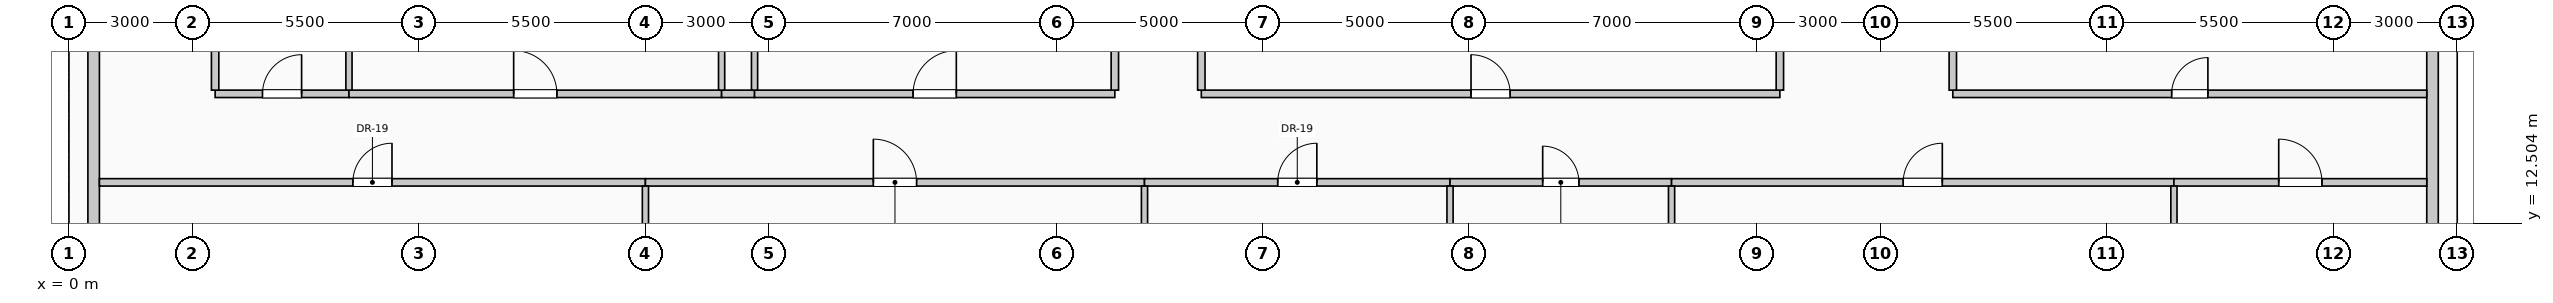
"""IFC4 building model, lengths in metres.
Left out: names, types, materials, properties, quantities, classifications, styles, units other than length and angle.
Written with IfcOpenShell. Run it as: python <this file> out.ifc"""

import sys

from ifc_helpers import new_model, si_unit, direction, frame, frame_2d, origin, place, context, subcontext, project, spatial, rectangle, extrude, element, fill, save


model = new_model("IFC4")
c1 = context("Model", 3, precision=1e-05, world=origin(), true_north=direction((0.0, 1.0)))
c2 = subcontext(c1, "Body", "Model", "MODEL_VIEW")
j1 = project(units=[si_unit("LENGTHUNIT", "METRE"), si_unit("PLANEANGLEUNIT", "RADIAN")], contexts=[c1])
p1 = place(None, origin())
s1 = spatial("IfcSite", under=j1, at=p1, CompositionType="ELEMENT")
p2 = place(p1, origin())
s2 = spatial("IfcBuilding", under=s1, at=p2, CompositionType="ELEMENT")
p3 = place(p2, frame((0.0, 0.0, 116.6)))
s3 = spatial("IfcBuildingStorey", under=s2, at=p3, CompositionType="ELEMENT", Elevation=116.6)
for number, where, z_axis, x_axis in (
    (1, (0.6, 10.445, 0.0), (0.0, 0.0, 1.0), (0.0, 1.0, 0.0)),
    (2, (57.4, 17.555, 0.0), (0.0, 0.0, 1.0), (0.0, -1.0, 0.0)),
):
    element("IfcWall", number, at=place(p3, frame(where, z_axis=z_axis, x_axis=x_axis)), inside=s3, PredefinedType="SOLIDWALL", context=c2, shape_type="SweptSolid", body=[
        extrude(rectangle(XDim=7.11, YDim=0.28, at=frame_2d((3.555, 0.0))), origin(), (0.0, 0.0, 1.0), 2.875),
    ])
p4 = place(p3, frame((0.74, 13.5, 0.0), z_axis=(0.0, 0.0, 1.0), x_axis=(1.0, 0.0, 0.0)))
e3 = element("IfcWall", 3, at=p4, inside=s3, PredefinedType="PARTITIONING", context=c2, shape_type="SweptSolid", body=[
    extrude(rectangle(XDim=13.26, YDim=0.18, at=frame_2d((6.63, 0.0))), origin(), (0.0, 0.0, 1.0), 3.725),
])
p5 = place(p4, frame((6.155, 0.0, 0.0)))
e4 = element("IfcOpeningElement", 4, at=p5, cuts=e3, PredefinedType="OPENING", context=c2, shape_type="SweptSolid", body=[
    extrude(rectangle(XDim=0.95, YDim=2.15, at=frame_2d((0.475, 1.075))), frame((0.0, 0.1, 0.0), z_axis=(0.0, -1.0, 0.0), x_axis=(1.0, 0.0, 0.0)), (0.0, 0.0, 1.0), 0.2),
])
p6 = place(p3, frame((14.0, 13.5, 0.0), z_axis=(0.0, 0.0, 1.0), x_axis=(1.0, 0.0, 0.0)))
e5 = element("IfcWall", 5, at=p6, inside=s3, PredefinedType="PARTITIONING", context=c2, shape_type="SweptSolid", body=[
    extrude(rectangle(XDim=12.12, YDim=0.18, at=frame_2d((6.06, 0.0))), origin(), (0.0, 0.0, 1.0), 3.725),
])
p7 = place(p6, frame((5.535, 0.0, 0.0)))
e6 = element("IfcOpeningElement", 6, at=p7, cuts=e5, PredefinedType="OPENING", context=c2, shape_type="SweptSolid", body=[
    extrude(rectangle(XDim=1.05, YDim=2.15, at=frame_2d((0.525, 1.075))), frame((0.0, 0.1, 0.0), z_axis=(0.0, -1.0, 0.0), x_axis=(1.0, 0.0, 0.0)), (0.0, 0.0, 1.0), 0.2),
])
p8 = place(p3, frame((26.12, 13.5, 0.0), z_axis=(0.0, 0.0, 1.0), x_axis=(1.0, 0.0, 0.0)))
e7 = element("IfcWall", 7, at=p8, inside=s3, PredefinedType="PARTITIONING", context=c2, shape_type="SweptSolid", body=[
    extrude(rectangle(XDim=7.42, YDim=0.18, at=frame_2d((3.71, 0.0))), origin(), (0.0, 0.0, 1.0), 3.725),
])
p9 = place(p8, frame((3.235, 0.0, 0.0)))
e8 = element("IfcOpeningElement", 8, at=p9, cuts=e7, PredefinedType="OPENING", context=c2, shape_type="SweptSolid", body=[
    extrude(rectangle(XDim=0.95, YDim=2.15, at=frame_2d((0.475, 1.075))), frame((0.0, 0.1, 0.0), z_axis=(0.0, -1.0, 0.0), x_axis=(1.0, 0.0, 0.0)), (0.0, 0.0, 1.0), 0.2),
])
p10 = place(p3, frame((33.54, 13.5, 0.0), z_axis=(0.0, 0.0, 1.0), x_axis=(1.0, 0.0, 0.0)))
e9 = element("IfcWall", 9, at=p10, inside=s3, PredefinedType="PARTITIONING", context=c2, shape_type="SweptSolid", body=[
    extrude(rectangle(XDim=5.38, YDim=0.18, at=frame_2d((2.69, 0.0))), origin(), (0.0, 0.0, 1.0), 3.725),
])
p11 = place(p10, frame((2.25, 0.0, 0.0)))
e10 = element("IfcOpeningElement", 10, at=p11, cuts=e9, PredefinedType="OPENING", context=c2, shape_type="SweptSolid", body=[
    extrude(rectangle(XDim=0.88, YDim=2.1, at=frame_2d((0.44, 1.05))), frame((0.0, 0.1, 0.0), z_axis=(0.0, -1.0, 0.0), x_axis=(1.0, 0.0, 0.0)), (0.0, 0.0, 1.0), 0.2),
])
p12 = place(p3, frame((38.92, 13.5, 0.0), z_axis=(0.0, 0.0, 1.0), x_axis=(1.0, 0.0, 0.0)))
e11 = element("IfcWall", 11, at=p12, inside=s3, PredefinedType="PARTITIONING", context=c2, shape_type="SweptSolid", body=[
    extrude(rectangle(XDim=12.2, YDim=0.18, at=frame_2d((6.1, 0.0))), origin(), (0.0, 0.0, 1.0), 3.725),
])
p13 = place(p12, frame((5.625, 0.0, 0.0)))
e12 = element("IfcOpeningElement", 12, at=p13, cuts=e11, PredefinedType="OPENING", context=c2, shape_type="SweptSolid", body=[
    extrude(rectangle(XDim=0.95, YDim=2.15, at=frame_2d((0.475, 1.075))), frame((0.0, 0.1, 0.0), z_axis=(0.0, -1.0, 0.0), x_axis=(1.0, 0.0, 0.0)), (0.0, 0.0, 1.0), 0.2),
])
p14 = place(p3, frame((51.12, 13.5, 0.0), z_axis=(0.0, 0.0, 1.0), x_axis=(1.0, 0.0, 0.0)))
e13 = element("IfcWall", 13, at=p14, inside=s3, PredefinedType="PARTITIONING", context=c2, shape_type="SweptSolid", body=[
    extrude(rectangle(XDim=6.14, YDim=0.18, at=frame_2d((3.07, 0.0))), origin(), (0.0, 0.0, 1.0), 3.725),
])
p15 = place(p14, frame((2.545, 0.0, 0.0)))
e14 = element("IfcOpeningElement", 14, at=p15, cuts=e13, PredefinedType="OPENING", context=c2, shape_type="SweptSolid", body=[
    extrude(rectangle(XDim=1.05, YDim=2.15, at=frame_2d((0.525, 1.075))), frame((0.0, 0.1, 0.0), z_axis=(0.0, -1.0, 0.0), x_axis=(1.0, 0.0, 0.0)), (0.0, 0.0, 1.0), 0.2),
])
p16 = place(p3, frame((3.55, 15.65, 0.0), z_axis=(0.0, 0.0, 1.0), x_axis=(1.0, 0.0, 0.0)))
e15 = element("IfcWall", 15, at=p16, inside=s3, PredefinedType="PARTITIONING", context=c2, shape_type="SweptSolid", body=[
    extrude(rectangle(XDim=3.25, YDim=0.18, at=frame_2d((1.625, 0.0))), origin(), (0.0, 0.0, 1.0), 3.725),
])
p17 = place(p16, frame((1.15, 0.0, 0.0)))
e16 = element("IfcOpeningElement", 16, at=p17, cuts=e15, PredefinedType="OPENING", context=c2, shape_type="SweptSolid", body=[
    extrude(rectangle(XDim=0.95, YDim=2.15, at=frame_2d((0.475, 1.075))), frame((0.0, 0.1, 0.0), z_axis=(0.0, -1.0, 0.0), x_axis=(1.0, 0.0, 0.0)), (0.0, 0.0, 1.0), 0.2),
])
p18 = place(p3, frame((6.8, 15.65, 0.0), z_axis=(0.0, 0.0, 1.0), x_axis=(1.0, 0.0, 0.0)))
e17 = element("IfcWall", 17, at=p18, inside=s3, PredefinedType="PARTITIONING", context=c2, shape_type="SweptSolid", body=[
    extrude(rectangle(XDim=9.05, YDim=0.18, at=frame_2d((4.525, 0.0))), origin(), (0.0, 0.0, 1.0), 3.725),
])
p19 = place(p18, frame((4.0, 0.0, 0.0)))
e18 = element("IfcOpeningElement", 18, at=p19, cuts=e17, PredefinedType="OPENING", context=c2, shape_type="SweptSolid", body=[
    extrude(rectangle(XDim=1.05, YDim=2.15, at=frame_2d((0.525, 1.075))), frame((0.0, 0.1, 0.0), z_axis=(0.0, -1.0, 0.0), x_axis=(1.0, 0.0, 0.0)), (0.0, 0.0, 1.0), 0.2),
])
p20 = place(p3, frame((15.85, 15.65, 0.0), z_axis=(0.0, 0.0, 1.0), x_axis=(1.0, 0.0, 0.0)))
e19 = element("IfcWall", 19, at=p20, inside=s3, PredefinedType="PARTITIONING", context=c2, shape_type="SweptSolid", body=[
    extrude(rectangle(XDim=0.8, YDim=0.18, at=frame_2d((0.4, 0.0))), origin(), (0.0, 0.0, 1.0), 3.725),
])
p21 = place(p3, frame((16.65, 15.65, 0.0), z_axis=(0.0, 0.0, 1.0), x_axis=(1.0, 0.0, 0.0)))
e20 = element("IfcWall", 20, at=p21, inside=s3, PredefinedType="PARTITIONING", context=c2, shape_type="SweptSolid", body=[
    extrude(rectangle(XDim=8.75, YDim=0.18, at=frame_2d((4.375, 0.0))), origin(), (0.0, 0.0, 1.0), 3.725),
])
p22 = place(p21, frame((3.85, 0.0, 0.0)))
e21 = element("IfcOpeningElement", 21, at=p22, cuts=e20, PredefinedType="OPENING", context=c2, shape_type="SweptSolid", body=[
    extrude(rectangle(XDim=1.05, YDim=2.15, at=frame_2d((0.525, 1.075))), frame((0.0, 0.1, 0.0), z_axis=(0.0, -1.0, 0.0), x_axis=(1.0, 0.0, 0.0)), (0.0, 0.0, 1.0), 0.2),
])
p23 = place(p3, frame((27.5, 15.65, 0.0), z_axis=(0.0, 0.0, 1.0), x_axis=(1.0, 0.0, 0.0)))
e22 = element("IfcWall", 22, at=p23, inside=s3, PredefinedType="PARTITIONING", context=c2, shape_type="SweptSolid", body=[
    extrude(rectangle(XDim=14.05, YDim=0.18, at=frame_2d((7.025, 0.0))), origin(), (0.0, 0.0, 1.0), 3.725),
])
p24 = place(p23, frame((6.55, 0.0, 0.0)))
e23 = element("IfcOpeningElement", 23, at=p24, cuts=e22, PredefinedType="OPENING", context=c2, shape_type="SweptSolid", body=[
    extrude(rectangle(XDim=0.95, YDim=2.15, at=frame_2d((0.475, 1.075))), frame((0.0, 0.1, 0.0), z_axis=(0.0, -1.0, 0.0), x_axis=(1.0, 0.0, 0.0)), (0.0, 0.0, 1.0), 0.2),
])
p25 = place(p3, frame((45.75, 15.65, 0.0), z_axis=(0.0, 0.0, 1.0), x_axis=(1.0, 0.0, 0.0)))
e24 = element("IfcWall", 24, at=p25, inside=s3, PredefinedType="PARTITIONING", context=c2, shape_type="SweptSolid", body=[
    extrude(rectangle(XDim=11.51, YDim=0.18, at=frame_2d((5.755, 0.0))), origin(), (0.0, 0.0, 1.0), 3.725),
])
p26 = place(p25, frame((5.315, 0.0, 0.0)))
e25 = element("IfcOpeningElement", 25, at=p26, cuts=e24, PredefinedType="OPENING", context=c2, shape_type="SweptSolid", body=[
    extrude(rectangle(XDim=0.88, YDim=2.1, at=frame_2d((0.44, 1.05))), frame((0.0, 0.1, 0.0), z_axis=(0.0, -1.0, 0.0), x_axis=(1.0, 0.0, 0.0)), (0.0, 0.0, 1.0), 0.2),
])
p27 = place(p3, frame((3.55, 15.74, 0.0), z_axis=(0.0, 0.0, 1.0), x_axis=(0.0, 1.0, 0.0)))
e26 = element("IfcWall", 26, at=p27, inside=s3, PredefinedType="PARTITIONING", context=c2, shape_type="SweptSolid", body=[
    extrude(rectangle(XDim=3.135, YDim=0.18, at=frame_2d((1.567, 0.0))), origin(), (0.0, 0.0, 1.0), 3.725),
])
p28 = place(p3, frame((6.8, 15.74, 0.0), z_axis=(0.0, 0.0, 1.0), x_axis=(0.0, 1.0, 0.0)))
e27 = element("IfcWall", 27, at=p28, inside=s3, PredefinedType="PARTITIONING", context=c2, shape_type="SweptSolid", body=[
    extrude(rectangle(XDim=3.135, YDim=0.15, at=frame_2d((1.567, 0.0))), origin(), (0.0, 0.0, 1.0), 3.725),
])
p29 = place(p3, frame((14.0, 1.175, 0.0), z_axis=(0.0, 0.0, 1.0), x_axis=(0.0, 1.0, 0.0)))
e28 = element("IfcWall", 28, at=p29, inside=s3, PredefinedType="PARTITIONING", context=c2, shape_type="SweptSolid", body=[
    extrude(rectangle(XDim=12.235, YDim=0.15, at=frame_2d((6.117, 0.0))), origin(), (0.0, 0.0, 1.0), 3.725),
])
p30 = place(p3, frame((15.85, 15.74, 0.0), z_axis=(0.0, 0.0, 1.0), x_axis=(0.0, 1.0, 0.0)))
e29 = element("IfcWall", 29, at=p30, inside=s3, PredefinedType="PARTITIONING", context=c2, shape_type="SweptSolid", body=[
    extrude(rectangle(XDim=1.76, YDim=0.15, at=frame_2d((0.88, 0.0))), origin(), (0.0, 0.0, 1.0), 3.725),
])
p31 = place(p3, frame((16.65, 15.74, 0.0), z_axis=(0.0, 0.0, 1.0), x_axis=(0.0, 1.0, 0.0)))
e30 = element("IfcWall", 30, at=p31, inside=s3, PredefinedType="PARTITIONING", context=c2, shape_type="SweptSolid", body=[
    extrude(rectangle(XDim=1.76, YDim=0.15, at=frame_2d((0.88, 0.0))), origin(), (0.0, 0.0, 1.0), 3.07),
])
p32 = place(p3, frame((25.4, 15.74, 0.0), z_axis=(0.0, 0.0, 1.0), x_axis=(0.0, 1.0, 0.0)))
e31 = element("IfcWall", 31, at=p32, inside=s3, PredefinedType="PARTITIONING", context=c2, shape_type="SweptSolid", body=[
    extrude(rectangle(XDim=7.585, YDim=0.18, at=frame_2d((3.792, 0.0))), origin(), (0.0, 0.0, 1.0), 3.725),
])
p33 = place(p3, frame((26.12, 0.74, 0.0), z_axis=(0.0, 0.0, 1.0), x_axis=(0.0, 1.0, 0.0)))
e32 = element("IfcWall", 32, at=p33, inside=s3, PredefinedType="PARTITIONING", context=c2, shape_type="SweptSolid", body=[
    extrude(rectangle(XDim=12.67, YDim=0.15, at=frame_2d((6.335, 0.0))), origin(), (0.0, 0.0, 1.0), 3.725),
])
p34 = place(p3, frame((27.5, 15.74, 0.0), z_axis=(0.0, 0.0, 1.0), x_axis=(0.0, 1.0, 0.0)))
e33 = element("IfcWall", 33, at=p34, inside=s3, PredefinedType="PARTITIONING", context=c2, shape_type="SweptSolid", body=[
    extrude(rectangle(XDim=9.57, YDim=0.18, at=frame_2d((4.785, 0.0))), origin(), (0.0, 0.0, 1.0), 3.725),
])
p35 = place(p3, frame((33.54, 1.3, 0.0), z_axis=(0.0, 0.0, 1.0), x_axis=(0.0, 1.0, 0.0)))
e34 = element("IfcWall", 34, at=p35, inside=s3, PredefinedType="PARTITIONING", context=c2, shape_type="SweptSolid", body=[
    extrude(rectangle(XDim=12.11, YDim=0.15, at=frame_2d((6.055, 0.0))), origin(), (0.0, 0.0, 1.0), 3.725),
])
p36 = place(p3, frame((38.92, 0.74, 0.0), z_axis=(0.0, 0.0, 1.0), x_axis=(0.0, 1.0, 0.0)))
e35 = element("IfcWall", 35, at=p36, inside=s3, PredefinedType="PARTITIONING", context=c2, shape_type="SweptSolid", body=[
    extrude(rectangle(XDim=12.67, YDim=0.15, at=frame_2d((6.335, 0.0))), origin(), (0.0, 0.0, 1.0), 3.725),
])
p37 = place(p3, frame((41.55, 15.74, 0.0), z_axis=(0.0, 0.0, 1.0), x_axis=(0.0, 1.0, 0.0)))
e36 = element("IfcWall", 36, at=p37, inside=s3, PredefinedType="PARTITIONING", context=c2, shape_type="SweptSolid", body=[
    extrude(rectangle(XDim=1.76, YDim=0.18, at=frame_2d((0.88, 0.0))), origin(), (0.0, 0.0, 1.0), 3.07),
])
p38 = place(p3, frame((45.75, 15.74, 0.0), z_axis=(0.0, 0.0, 1.0), x_axis=(0.0, 1.0, 0.0)))
e37 = element("IfcWall", 37, at=p38, inside=s3, PredefinedType="PARTITIONING", context=c2, shape_type="SweptSolid", body=[
    extrude(rectangle(XDim=16.535, YDim=0.18, at=frame_2d((8.268, 0.0))), origin(), (0.0, 0.0, 1.0), 3.725),
])
p39 = place(p3, frame((51.12, 0.74, 0.0), z_axis=(0.0, 0.0, 1.0), x_axis=(0.0, 1.0, 0.0)))
e38 = element("IfcWall", 38, at=p39, inside=s3, PredefinedType="PARTITIONING", context=c2, shape_type="SweptSolid", body=[
    extrude(rectangle(XDim=12.67, YDim=0.15, at=frame_2d((6.335, 0.0))), origin(), (0.0, 0.0, 1.0), 3.725),
])
p40 = place(p5, origin())
e39 = element("IfcDoor", 39, at=p40, inside=s3, OperationType="SINGLE_SWING_RIGHT", PredefinedType="DOOR", context=c2, shape_type="SweptSolid", body=[
    extrude(rectangle(XDim=0.95, YDim=2.15, at=frame_2d((0.475, 1.075))), frame((0.0, 0.025, 0.0), z_axis=(0.0, -1.0, 0.0), x_axis=(1.0, 0.0, 0.0)), (0.0, 0.0, 1.0), 0.05),
])
fill(e4, e39)
p41 = place(p7, origin())
e40 = element("IfcDoor", 40, at=p41, inside=s3, OperationType="SINGLE_SWING_LEFT", PredefinedType="DOOR", context=c2, shape_type="SweptSolid", body=[
    extrude(rectangle(XDim=1.05, YDim=2.15, at=frame_2d((0.525, 1.075))), frame((0.0, 0.025, 0.0), z_axis=(0.0, -1.0, 0.0), x_axis=(1.0, 0.0, 0.0)), (0.0, 0.0, 1.0), 0.05),
])
fill(e6, e40)
p42 = place(p9, origin())
e41 = element("IfcDoor", 41, at=p42, inside=s3, OperationType="SINGLE_SWING_RIGHT", PredefinedType="DOOR", context=c2, shape_type="SweptSolid", body=[
    extrude(rectangle(XDim=0.95, YDim=2.15, at=frame_2d((0.475, 1.075))), frame((0.0, 0.025, 0.0), z_axis=(0.0, -1.0, 0.0), x_axis=(1.0, 0.0, 0.0)), (0.0, 0.0, 1.0), 0.05),
])
fill(e8, e41)
p43 = place(p11, origin())
e42 = element("IfcDoor", 42, at=p43, inside=s3, OperationType="SINGLE_SWING_LEFT", PredefinedType="DOOR", context=c2, shape_type="SweptSolid", body=[
    extrude(rectangle(XDim=0.88, YDim=2.1, at=frame_2d((0.44, 1.05))), frame((0.0, 0.025, 0.0), z_axis=(0.0, -1.0, 0.0), x_axis=(1.0, 0.0, 0.0)), (0.0, 0.0, 1.0), 0.05),
])
fill(e10, e42)
p44 = place(p13, origin())
e43 = element("IfcDoor", 43, at=p44, inside=s3, OperationType="SINGLE_SWING_RIGHT", PredefinedType="DOOR", context=c2, shape_type="SweptSolid", body=[
    extrude(rectangle(XDim=0.95, YDim=2.15, at=frame_2d((0.475, 1.075))), frame((0.0, 0.025, 0.0), z_axis=(0.0, -1.0, 0.0), x_axis=(1.0, 0.0, 0.0)), (0.0, 0.0, 1.0), 0.05),
])
fill(e12, e43)
p45 = place(p15, origin())
e44 = element("IfcDoor", 44, at=p45, inside=s3, OperationType="SINGLE_SWING_LEFT", PredefinedType="DOOR", context=c2, shape_type="SweptSolid", body=[
    extrude(rectangle(XDim=1.05, YDim=2.15, at=frame_2d((0.525, 1.075))), frame((0.0, 0.025, 0.0), z_axis=(0.0, -1.0, 0.0), x_axis=(1.0, 0.0, 0.0)), (0.0, 0.0, 1.0), 0.05),
])
fill(e14, e44)
p46 = place(p17, origin())
e45 = element("IfcDoor", 45, at=p46, inside=s3, OperationType="SINGLE_SWING_RIGHT", PredefinedType="DOOR", context=c2, shape_type="SweptSolid", body=[
    extrude(rectangle(XDim=0.95, YDim=2.15, at=frame_2d((0.475, 1.075))), frame((0.0, 0.025, 0.0), z_axis=(0.0, -1.0, 0.0), x_axis=(1.0, 0.0, 0.0)), (0.0, 0.0, 1.0), 0.05),
])
fill(e16, e45)
p47 = place(p19, origin())
e46 = element("IfcDoor", 46, at=p47, inside=s3, OperationType="SINGLE_SWING_LEFT", PredefinedType="DOOR", context=c2, shape_type="SweptSolid", body=[
    extrude(rectangle(XDim=1.05, YDim=2.15, at=frame_2d((0.525, 1.075))), frame((0.0, 0.025, 0.0), z_axis=(0.0, -1.0, 0.0), x_axis=(1.0, 0.0, 0.0)), (0.0, 0.0, 1.0), 0.05),
])
fill(e18, e46)
p48 = place(p22, origin())
e47 = element("IfcDoor", 47, at=p48, inside=s3, OperationType="SINGLE_SWING_RIGHT", PredefinedType="DOOR", context=c2, shape_type="SweptSolid", body=[
    extrude(rectangle(XDim=1.05, YDim=2.15, at=frame_2d((0.525, 1.075))), frame((0.0, 0.025, 0.0), z_axis=(0.0, -1.0, 0.0), x_axis=(1.0, 0.0, 0.0)), (0.0, 0.0, 1.0), 0.05),
])
fill(e21, e47)
p49 = place(p24, origin())
e48 = element("IfcDoor", 48, at=p49, inside=s3, OperationType="SINGLE_SWING_LEFT", PredefinedType="DOOR", context=c2, shape_type="SweptSolid", body=[
    extrude(rectangle(XDim=0.95, YDim=2.15, at=frame_2d((0.475, 1.075))), frame((0.0, 0.025, 0.0), z_axis=(0.0, -1.0, 0.0), x_axis=(1.0, 0.0, 0.0)), (0.0, 0.0, 1.0), 0.05),
])
fill(e23, e48)
p50 = place(p26, origin())
e49 = element("IfcDoor", 49, at=p50, inside=s3, OperationType="SINGLE_SWING_RIGHT", PredefinedType="DOOR", context=c2, shape_type="SweptSolid", body=[
    extrude(rectangle(XDim=0.88, YDim=2.1, at=frame_2d((0.44, 1.05))), frame((0.0, 0.025, 0.0), z_axis=(0.0, -1.0, 0.0), x_axis=(1.0, 0.0, 0.0)), (0.0, 0.0, 1.0), 0.05),
])
fill(e25, e49)
save(model, sys.argv[1])
